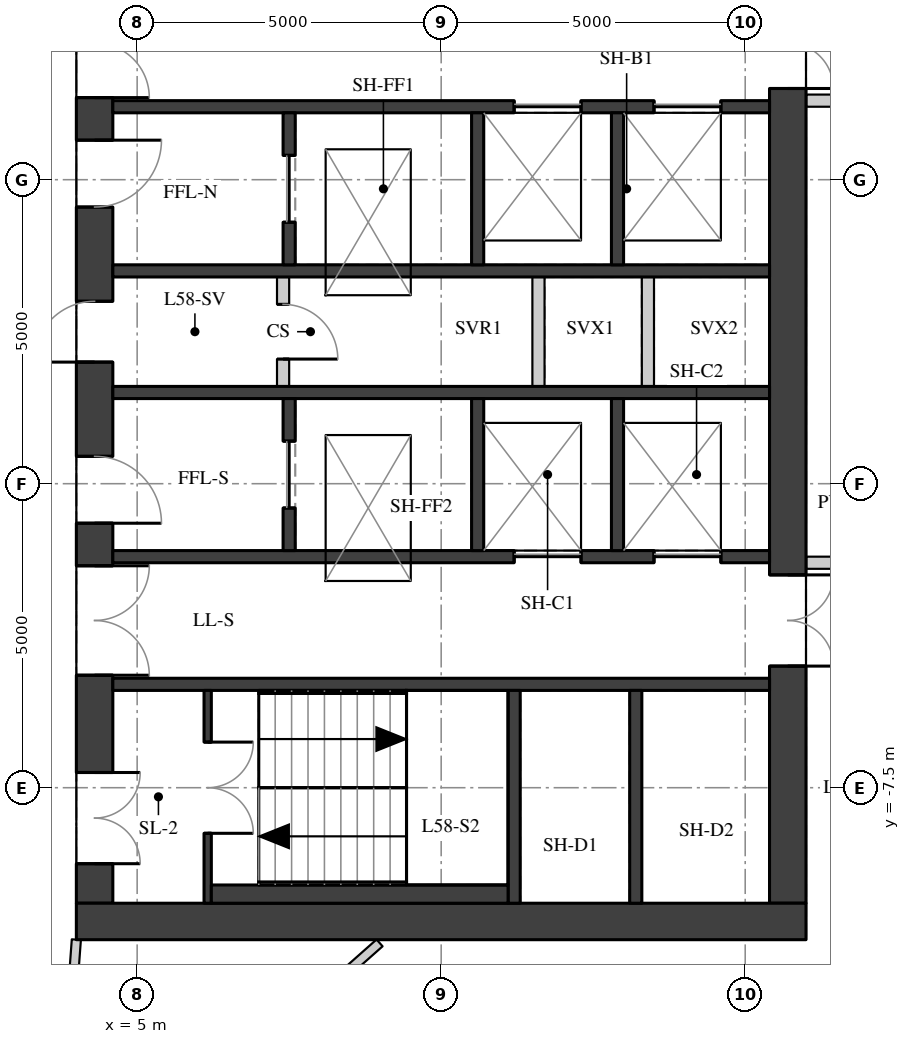
"""IFC4 building model, lengths in metres.
Left out: names, types, materials, properties, quantities, classifications, styles, units other than length and angle.
Written with IfcOpenShell. Run it as: python <this file> out.ifc"""

import sys

from ifc_helpers import new_model, si_unit, direction, frame, frame_2d, origin, place, context, subcontext, project, spatial, rectangle, extrude, element, fill, save


model = new_model("IFC4")
c1 = context("Model", 3, precision=1e-05, world=origin(), true_north=direction((0.0, 1.0)))
c2 = subcontext(c1, "Body", "Model", "MODEL_VIEW")
j1 = project(units=[si_unit("LENGTHUNIT", "METRE"), si_unit("PLANEANGLEUNIT", "RADIAN")], contexts=[c1])
p1 = place(None, origin())
s1 = spatial("IfcSite", under=j1, at=p1, CompositionType="ELEMENT")
p2 = place(p1, origin())
s2 = spatial("IfcBuilding", under=s1, at=p2, CompositionType="ELEMENT")
p3 = place(p2, frame((0.0, 0.0, 205.7)))
s3 = spatial("IfcBuildingStorey", under=s2, at=p3, CompositionType="ELEMENT", Elevation=205.7)
p4 = place(p3, frame((4.3, -9.4, 0.0), z_axis=(0.0, 0.0, 1.0), x_axis=(0.0, 1.0, 0.0)))
e1 = element("IfcWall", 1, at=p4, inside=s3, PredefinedType="SHEAR", context=c2, shape_type="SweptSolid", body=[
    extrude(rectangle(XDim=18.8, YDim=0.6, at=frame_2d((9.4, 0.0))), origin(), (0.0, 0.0, 1.0), 3.02),
])
p5 = place(p4, frame((0.65, 0.0, 0.0)))
e2 = element("IfcOpeningElement", 2, at=p5, cuts=e1, PredefinedType="OPENING", context=c2, shape_type="SweptSolid", body=[
    extrude(rectangle(XDim=1.5, YDim=2.1, at=frame_2d((0.75, 1.05))), frame((0.0, 0.31, 0.0), z_axis=(0.0, -1.0, 0.0), x_axis=(1.0, 0.0, 0.0)), (0.0, 0.0, 1.0), 0.62),
])
p6 = place(p4, frame((3.75, 0.0, 0.0)))
e3 = element("IfcOpeningElement", 3, at=p6, cuts=e1, PredefinedType="OPENING", context=c2, shape_type="SweptSolid", body=[
    extrude(rectangle(XDim=1.8, YDim=2.1, at=frame_2d((0.9, 1.05))), frame((0.0, 0.31, 0.0), z_axis=(0.0, -1.0, 0.0), x_axis=(1.0, 0.0, 0.0)), (0.0, 0.0, 1.0), 0.62),
])
p7 = place(p4, frame((6.25, 0.0, 0.0)))
e4 = element("IfcOpeningElement", 4, at=p7, cuts=e1, PredefinedType="OPENING", context=c2, shape_type="SweptSolid", body=[
    extrude(rectangle(XDim=1.1, YDim=2.1, at=frame_2d((0.55, 1.05))), frame((0.0, 0.31, 0.0), z_axis=(0.0, -1.0, 0.0), x_axis=(1.0, 0.0, 0.0)), (0.0, 0.0, 1.0), 0.62),
])
p8 = place(p4, frame((8.9, 0.0, 0.0)))
e5 = element("IfcOpeningElement", 5, at=p8, cuts=e1, PredefinedType="OPENING", context=c2, shape_type="SweptSolid", body=[
    extrude(rectangle(XDim=1.0, YDim=2.1, at=frame_2d((0.5, 1.05))), frame((0.0, 0.31, 0.0), z_axis=(0.0, -1.0, 0.0), x_axis=(1.0, 0.0, 0.0)), (0.0, 0.0, 1.0), 0.62),
])
p9 = place(p4, frame((11.45, 0.0, 0.0)))
e6 = element("IfcOpeningElement", 6, at=p9, cuts=e1, PredefinedType="OPENING", context=c2, shape_type="SweptSolid", body=[
    extrude(rectangle(XDim=1.1, YDim=2.1, at=frame_2d((0.55, 1.05))), frame((0.0, 0.31, 0.0), z_axis=(0.0, -1.0, 0.0), x_axis=(1.0, 0.0, 0.0)), (0.0, 0.0, 1.0), 0.62),
])
p10 = place(p4, frame((13.25, 0.0, 0.0)))
e7 = element("IfcOpeningElement", 7, at=p10, cuts=e1, PredefinedType="OPENING", context=c2, shape_type="SweptSolid", body=[
    extrude(rectangle(XDim=1.8, YDim=2.1, at=frame_2d((0.9, 1.05))), frame((0.0, 0.31, 0.0), z_axis=(0.0, -1.0, 0.0), x_axis=(1.0, 0.0, 0.0)), (0.0, 0.0, 1.0), 0.62),
])
p11 = place(p4, frame((16.65, 0.0, 0.0)))
e8 = element("IfcOpeningElement", 8, at=p11, cuts=e1, PredefinedType="OPENING", context=c2, shape_type="SweptSolid", body=[
    extrude(rectangle(XDim=1.5, YDim=2.1, at=frame_2d((0.75, 1.05))), frame((0.0, 0.31, 0.0), z_axis=(0.0, -1.0, 0.0), x_axis=(1.0, 0.0, 0.0)), (0.0, 0.0, 1.0), 0.62),
])
p12 = place(p3, frame((15.7, -9.4, 0.0), z_axis=(0.0, 0.0, 1.0), x_axis=(0.0, 1.0, 0.0)))
e9 = element("IfcWall", 9, at=p12, inside=s3, PredefinedType="SHEAR", context=c2, shape_type="SweptSolid", body=[
    extrude(rectangle(XDim=18.8, YDim=0.6, at=frame_2d((9.4, 0.0))), origin(), (0.0, 0.0, 1.0), 3.02),
])
p13 = place(p12, frame((13.4, 0.0, 0.0)))
e10 = element("IfcOpeningElement", 10, at=p13, cuts=e9, PredefinedType="OPENING", context=c2, shape_type="SweptSolid", body=[
    extrude(rectangle(XDim=1.5, YDim=2.1, at=frame_2d((0.75, 1.05))), frame((0.0, 0.31, 0.0), z_axis=(0.0, -1.0, 0.0), x_axis=(1.0, 0.0, 0.0)), (0.0, 0.0, 1.0), 0.62),
])
p14 = place(p12, frame((3.9, 0.0, 0.0)))
e11 = element("IfcOpeningElement", 11, at=p14, cuts=e9, PredefinedType="OPENING", context=c2, shape_type="SweptSolid", body=[
    extrude(rectangle(XDim=1.5, YDim=2.1, at=frame_2d((0.75, 1.05))), frame((0.0, 0.31, 0.0), z_axis=(0.0, -1.0, 0.0), x_axis=(1.0, 0.0, 0.0)), (0.0, 0.0, 1.0), 0.62),
])
p15 = place(p3, frame((4.0, -9.7, 0.0), z_axis=(0.0, 0.0, 1.0), x_axis=(1.0, 0.0, 0.0)))
e12 = element("IfcWall", 12, at=p15, inside=s3, PredefinedType="SHEAR", context=c2, shape_type="SweptSolid", body=[
    extrude(rectangle(XDim=12.0, YDim=0.6, at=frame_2d((6.0, 0.0))), origin(), (0.0, 0.0, 1.0), 3.02),
])
p16 = place(p3, frame((4.6, 3.7, 0.0), z_axis=(0.0, 0.0, 1.0), x_axis=(1.0, 0.0, 0.0)))
e13 = element("IfcWall", 13, at=p16, inside=s3, PredefinedType="SHEAR", context=c2, shape_type="SweptSolid", body=[
    extrude(rectangle(XDim=10.8, YDim=0.2, at=frame_2d((5.4, 0.0))), origin(), (0.0, 0.0, 1.0), 3.02),
])
p17 = place(p16, frame((6.6, 0.0, 0.0)))
e14 = element("IfcOpeningElement", 14, at=p17, cuts=e13, PredefinedType="OPENING", context=c2, shape_type="SweptSolid", body=[
    extrude(rectangle(XDim=1.1, YDim=2.1, at=frame_2d((0.55, 1.05))), frame((0.0, 0.11, 0.0), z_axis=(0.0, -1.0, 0.0), x_axis=(1.0, 0.0, 0.0)), (0.0, 0.0, 1.0), 0.22),
])
p18 = place(p16, frame((8.9, 0.0, 0.0)))
e15 = element("IfcOpeningElement", 15, at=p18, cuts=e13, PredefinedType="OPENING", context=c2, shape_type="SweptSolid", body=[
    extrude(rectangle(XDim=1.1, YDim=2.1, at=frame_2d((0.55, 1.05))), frame((0.0, 0.11, 0.0), z_axis=(0.0, -1.0, 0.0), x_axis=(1.0, 0.0, 0.0)), (0.0, 0.0, 1.0), 0.22),
])
for number, where, z_axis, x_axis in (
    (16, (4.6, 1.0, 0.0), (0.0, 0.0, 1.0), (1.0, 0.0, 0.0)),
    (17, (4.6, -1.0, 0.0), (0.0, 0.0, 1.0), (1.0, 0.0, 0.0)),
):
    element("IfcWall", number, at=place(p3, frame(where, z_axis=z_axis, x_axis=x_axis)), inside=s3, PredefinedType="SHEAR", context=c2, shape_type="SweptSolid", body=[
        extrude(rectangle(XDim=10.8, YDim=0.2, at=frame_2d((5.4, 0.0))), origin(), (0.0, 0.0, 1.0), 3.02),
    ])
p19 = place(p3, frame((4.6, -3.7, 0.0), z_axis=(0.0, 0.0, 1.0), x_axis=(1.0, 0.0, 0.0)))
e18 = element("IfcWall", 18, at=p19, inside=s3, PredefinedType="SHEAR", context=c2, shape_type="SweptSolid", body=[
    extrude(rectangle(XDim=10.8, YDim=0.2, at=frame_2d((5.4, 0.0))), origin(), (0.0, 0.0, 1.0), 3.02),
])
p20 = place(p19, frame((6.6, 0.0, 0.0)))
e19 = element("IfcOpeningElement", 19, at=p20, cuts=e18, PredefinedType="OPENING", context=c2, shape_type="SweptSolid", body=[
    extrude(rectangle(XDim=1.1, YDim=2.1, at=frame_2d((0.55, 1.05))), frame((0.0, 0.11, 0.0), z_axis=(0.0, -1.0, 0.0), x_axis=(1.0, 0.0, 0.0)), (0.0, 0.0, 1.0), 0.22),
])
p21 = place(p19, frame((8.9, 0.0, 0.0)))
e20 = element("IfcOpeningElement", 20, at=p21, cuts=e18, PredefinedType="OPENING", context=c2, shape_type="SweptSolid", body=[
    extrude(rectangle(XDim=1.1, YDim=2.1, at=frame_2d((0.55, 1.05))), frame((0.0, 0.11, 0.0), z_axis=(0.0, -1.0, 0.0), x_axis=(1.0, 0.0, 0.0)), (0.0, 0.0, 1.0), 0.22),
])
p22 = place(p3, frame((4.6, -5.8, 0.0), z_axis=(0.0, 0.0, 1.0), x_axis=(1.0, 0.0, 0.0)))
e21 = element("IfcWall", 21, at=p22, inside=s3, PredefinedType="SHEAR", context=c2, shape_type="SweptSolid", body=[
    extrude(rectangle(XDim=10.8, YDim=0.2, at=frame_2d((5.4, 0.0))), origin(), (0.0, 0.0, 1.0), 3.02),
])
for number, where, z_axis, x_axis in (
    (22, (11.2, -9.4, 0.0), (0.0, 0.0, 1.0), (0.0, 1.0, 0.0)),
    (23, (13.2, -9.4, 0.0), (0.0, 0.0, 1.0), (0.0, 1.0, 0.0)),
):
    element("IfcWall", number, at=place(p3, frame(where, z_axis=z_axis, x_axis=x_axis)), inside=s3, PredefinedType="SHEAR", context=c2, shape_type="SweptSolid", body=[
        extrude(rectangle(XDim=3.5, YDim=0.2, at=frame_2d((1.75, 0.0))), origin(), (0.0, 0.0, 1.0), 3.02),
    ])
p23 = place(p3, frame((7.5, 1.1, 0.0), z_axis=(0.0, 0.0, 1.0), x_axis=(0.0, 1.0, 0.0)))
e24 = element("IfcWall", 24, at=p23, inside=s3, PredefinedType="SHEAR", context=c2, shape_type="SweptSolid", body=[
    extrude(rectangle(XDim=2.5, YDim=0.2, at=frame_2d((1.25, 0.0))), origin(), (0.0, 0.0, 1.0), 3.02),
])
p24 = place(p23, frame((0.7, 0.0, 0.0)))
e25 = element("IfcOpeningElement", 25, at=p24, cuts=e24, PredefinedType="OPENING", context=c2, shape_type="SweptSolid", body=[
    extrude(rectangle(XDim=1.1, YDim=2.1, at=frame_2d((0.55, 1.05))), frame((0.0, 0.11, 0.0), z_axis=(0.0, -1.0, 0.0), x_axis=(1.0, 0.0, 0.0)), (0.0, 0.0, 1.0), 0.22),
])
p25 = place(p3, frame((7.5, -3.6, 0.0), z_axis=(0.0, 0.0, 1.0), x_axis=(0.0, 1.0, 0.0)))
e26 = element("IfcWall", 26, at=p25, inside=s3, PredefinedType="SHEAR", context=c2, shape_type="SweptSolid", body=[
    extrude(rectangle(XDim=2.5, YDim=0.2, at=frame_2d((1.25, 0.0))), origin(), (0.0, 0.0, 1.0), 3.02),
])
p26 = place(p25, frame((0.7, 0.0, 0.0)))
e27 = element("IfcOpeningElement", 27, at=p26, cuts=e26, PredefinedType="OPENING", context=c2, shape_type="SweptSolid", body=[
    extrude(rectangle(XDim=1.1, YDim=2.1, at=frame_2d((0.55, 1.05))), frame((0.0, 0.11, 0.0), z_axis=(0.0, -1.0, 0.0), x_axis=(1.0, 0.0, 0.0)), (0.0, 0.0, 1.0), 0.22),
])
for number, where, z_axis, x_axis in (
    (28, (10.6, 1.1, 0.0), (0.0, 0.0, 1.0), (0.0, 1.0, 0.0)),
    (29, (10.6, -3.6, 0.0), (0.0, 0.0, 1.0), (0.0, 1.0, 0.0)),
    (30, (12.9, 1.1, 0.0), (0.0, 0.0, 1.0), (0.0, 1.0, 0.0)),
    (31, (12.9, -3.6, 0.0), (0.0, 0.0, 1.0), (0.0, 1.0, 0.0)),
):
    element("IfcWall", number, at=place(p3, frame(where, z_axis=z_axis, x_axis=x_axis)), inside=s3, PredefinedType="SHEAR", context=c2, shape_type="SweptSolid", body=[
        extrude(rectangle(XDim=2.5, YDim=0.2, at=frame_2d((1.25, 0.0))), origin(), (0.0, 0.0, 1.0), 3.02),
    ])
p27 = place(p3, frame((6.16, -9.4, 0.0), z_axis=(0.0, 0.0, 1.0), x_axis=(0.0, 1.0, 0.0)))
e32 = element("IfcWall", 32, at=p27, inside=s3, PredefinedType="SHEAR", context=c2, shape_type="SweptSolid", body=[
    extrude(rectangle(XDim=3.5, YDim=0.12, at=frame_2d((1.75, 0.0))), origin(), (0.0, 0.0, 1.0), 3.02),
])
p28 = place(p27, frame((1.15, 0.0, 0.0)))
e33 = element("IfcOpeningElement", 33, at=p28, cuts=e32, PredefinedType="OPENING", context=c2, shape_type="SweptSolid", body=[
    extrude(rectangle(XDim=1.5, YDim=2.1, at=frame_2d((0.75, 1.05))), frame((0.0, 0.07, 0.0), z_axis=(0.0, -1.0, 0.0), x_axis=(1.0, 0.0, 0.0)), (0.0, 0.0, 1.0), 0.14),
])
p29 = place(p3, frame((7.4, -0.9, 0.0), z_axis=(0.0, 0.0, 1.0), x_axis=(0.0, 1.0, 0.0)))
e34 = element("IfcWall", 34, at=p29, inside=s3, PredefinedType="PARTITIONING", context=c2, shape_type="SweptSolid", body=[
    extrude(rectangle(XDim=1.8, YDim=0.2, at=frame_2d((0.9, 0.0))), origin(), (0.0, 0.0, 1.0), 3.02),
])
p30 = place(p29, frame((0.45, 0.0, 0.0)))
e35 = element("IfcOpeningElement", 35, at=p30, cuts=e34, PredefinedType="OPENING", context=c2, shape_type="SweptSolid", body=[
    extrude(rectangle(XDim=0.9, YDim=2.1, at=frame_2d((0.45, 1.05))), frame((0.0, 0.11, 0.0), z_axis=(0.0, -1.0, 0.0), x_axis=(1.0, 0.0, 0.0)), (0.0, 0.0, 1.0), 0.22),
])
for number, where, z_axis, x_axis in (
    (36, (11.6, -0.9, 0.0), (0.0, 0.0, 1.0), (0.0, 1.0, 0.0)),
    (37, (13.4, -0.9, 0.0), (0.0, 0.0, 1.0), (0.0, 1.0, 0.0)),
):
    element("IfcWall", number, at=place(p3, frame(where, z_axis=z_axis, x_axis=x_axis)), inside=s3, PredefinedType="PARTITIONING", context=c2, shape_type="SweptSolid", body=[
        extrude(rectangle(XDim=1.8, YDim=0.2, at=frame_2d((0.9, 0.0))), origin(), (0.0, 0.0, 1.0), 3.02),
    ])
p31 = place(p3, frame((6.22, -9.25, 0.0), z_axis=(0.0, 0.0, 1.0), x_axis=(1.0, 0.0, 0.0)))
e38 = element("IfcWall", 38, at=p31, inside=s3, PredefinedType="PARTITIONING", context=c2, shape_type="SweptSolid", body=[
    extrude(rectangle(XDim=4.88, YDim=0.3, at=frame_2d((2.44, 0.0))), origin(), (0.0, 0.0, 1.0), 3.02),
])
p32 = place(p3, frame((17.6, 3.8, 0.0), z_axis=(0.0, 0.0, 1.0), x_axis=(-1.0, 0.0, 0.0)))
e39 = element("IfcWall", 39, at=p32, inside=s3, PredefinedType="PARTITIONING", context=c2, shape_type="SweptSolid", body=[
    extrude(rectangle(XDim=1.596, YDim=0.2, at=frame_2d((0.798, 0.0))), origin(), (0.0, 0.0, 1.0), 3.02),
])
p33 = place(p3, frame((16.004, -3.8, 0.0), z_axis=(0.0, 0.0, 1.0), x_axis=(1.0, 0.0, 0.0)))
e40 = element("IfcWall", 40, at=p33, inside=s3, PredefinedType="PARTITIONING", context=c2, shape_type="SweptSolid", body=[
    extrude(rectangle(XDim=1.596, YDim=0.2, at=frame_2d((0.798, 0.0))), origin(), (0.0, 0.0, 1.0), 2.47),
])
p34 = place(p3, frame((8.987, -10.052, 0.0), z_axis=(0.0, 0.0, 1.0), x_axis=(-0.74833949077, -0.66331591761, 0.0)))
e41 = element("IfcWall", 41, at=p34, inside=s3, PredefinedType="PARTITIONING", context=c2, shape_type="SweptSolid", body=[
    extrude(rectangle(XDim=3.328, YDim=0.15, at=frame_2d((1.664, 0.0))), origin(), (0.0, 0.0, 1.0), 3.02),
])
p35 = place(p34, frame((1.214, 0.0, 0.0)))
e42 = element("IfcOpeningElement", 42, at=p35, cuts=e41, PredefinedType="OPENING", context=c2, shape_type="SweptSolid", body=[
    extrude(rectangle(XDim=0.9, YDim=2.1, at=frame_2d((0.45, 1.05))), frame((0.0, 0.085, 0.0), z_axis=(0.0, -1.0, 0.0), x_axis=(1.0, 0.0, 0.0)), (0.0, 0.0, 1.0), 0.17),
])
p36 = place(p3, frame((3.807, -12.588, 0.0), z_axis=(0.0, 0.0, 1.0), x_axis=(0.07420077159, 0.997243323114, 0.0)))
e43 = element("IfcWall", 43, at=p36, inside=s3, PredefinedType="PARTITIONING", context=c2, shape_type="SweptSolid", body=[
    extrude(rectangle(XDim=2.596, YDim=0.15, at=frame_2d((1.298, 0.0))), origin(), (0.0, 0.0, 1.0), 3.02),
])
p37 = place(p5, origin())
e44 = element("IfcDoor", 44, at=p37, inside=s3, OperationType="DOUBLE_DOOR_SINGLE_SWING", PredefinedType="DOOR", context=c2, shape_type="SweptSolid", body=[
    extrude(rectangle(XDim=1.5, YDim=2.1, at=frame_2d((0.75, 1.05))), frame((0.0, 0.025, 0.0), z_axis=(0.0, -1.0, 0.0), x_axis=(1.0, 0.0, 0.0)), (0.0, 0.0, 1.0), 0.05),
])
fill(e2, e44)
p38 = place(p6, origin())
e45 = element("IfcDoor", 45, at=p38, inside=s3, OperationType="DOUBLE_DOOR_SINGLE_SWING", PredefinedType="DOOR", context=c2, shape_type="SweptSolid", body=[
    extrude(rectangle(XDim=1.8, YDim=2.1, at=frame_2d((0.9, 1.05))), frame((0.0, 0.025, 0.0), z_axis=(0.0, -1.0, 0.0), x_axis=(1.0, 0.0, 0.0)), (0.0, 0.0, 1.0), 0.05),
])
fill(e3, e45)
p39 = place(p7, origin())
e46 = element("IfcDoor", 46, at=p39, inside=s3, OperationType="SINGLE_SWING_RIGHT", PredefinedType="DOOR", context=c2, shape_type="SweptSolid", body=[
    extrude(rectangle(XDim=1.1, YDim=2.1, at=frame_2d((0.55, 1.05))), frame((0.0, 0.025, 0.0), z_axis=(0.0, -1.0, 0.0), x_axis=(1.0, 0.0, 0.0)), (0.0, 0.0, 1.0), 0.05),
])
fill(e4, e46)
p40 = place(p8, origin())
e47 = element("IfcDoor", 47, at=p40, inside=s3, OperationType="SINGLE_SWING_LEFT", PredefinedType="DOOR", context=c2, shape_type="SweptSolid", body=[
    extrude(rectangle(XDim=1.0, YDim=2.1, at=frame_2d((0.5, 1.05))), frame((0.0, 0.025, 0.0), z_axis=(0.0, -1.0, 0.0), x_axis=(1.0, 0.0, 0.0)), (0.0, 0.0, 1.0), 0.05),
])
fill(e5, e47)
p41 = place(p9, origin())
e48 = element("IfcDoor", 48, at=p41, inside=s3, OperationType="SINGLE_SWING_LEFT", PredefinedType="DOOR", context=c2, shape_type="SweptSolid", body=[
    extrude(rectangle(XDim=1.1, YDim=2.1, at=frame_2d((0.55, 1.05))), frame((0.0, 0.025, 0.0), z_axis=(0.0, -1.0, 0.0), x_axis=(1.0, 0.0, 0.0)), (0.0, 0.0, 1.0), 0.05),
])
fill(e6, e48)
p42 = place(p10, origin())
e49 = element("IfcDoor", 49, at=p42, inside=s3, OperationType="DOUBLE_DOOR_SINGLE_SWING", PredefinedType="DOOR", context=c2, shape_type="SweptSolid", body=[
    extrude(rectangle(XDim=1.8, YDim=2.1, at=frame_2d((0.9, 1.05))), frame((0.0, 0.025, 0.0), z_axis=(0.0, -1.0, 0.0), x_axis=(1.0, 0.0, 0.0)), (0.0, 0.0, 1.0), 0.05),
])
fill(e7, e49)
p43 = place(p13, origin())
e50 = element("IfcDoor", 50, at=p43, inside=s3, OperationType="DOUBLE_DOOR_SINGLE_SWING", PredefinedType="DOOR", context=c2, shape_type="SweptSolid", body=[
    extrude(rectangle(XDim=1.5, YDim=2.1, at=frame_2d((0.75, 1.05))), frame((0.0, 0.025, 0.0), z_axis=(0.0, -1.0, 0.0), x_axis=(1.0, 0.0, 0.0)), (0.0, 0.0, 1.0), 0.05),
])
fill(e10, e50)
p44 = place(p14, origin())
e51 = element("IfcDoor", 51, at=p44, inside=s3, OperationType="DOUBLE_DOOR_SINGLE_SWING", PredefinedType="DOOR", context=c2, shape_type="SweptSolid", body=[
    extrude(rectangle(XDim=1.5, YDim=2.1, at=frame_2d((0.75, 1.05))), frame((0.0, 0.025, 0.0), z_axis=(0.0, -1.0, 0.0), x_axis=(1.0, 0.0, 0.0)), (0.0, 0.0, 1.0), 0.05),
])
fill(e11, e51)
p45 = place(p28, origin())
e52 = element("IfcDoor", 52, at=p45, inside=s3, OperationType="DOUBLE_DOOR_SINGLE_SWING", PredefinedType="DOOR", context=c2, shape_type="SweptSolid", body=[
    extrude(rectangle(XDim=1.5, YDim=2.1, at=frame_2d((0.75, 1.05))), frame((0.0, 0.025, 0.0), z_axis=(0.0, -1.0, 0.0), x_axis=(1.0, 0.0, 0.0)), (0.0, 0.0, 1.0), 0.05),
])
fill(e33, e52)
p46 = place(p17, origin())
e53 = element("IfcDoor", 53, at=p46, inside=s3, OperationType="DOUBLE_DOOR_SLIDING", PredefinedType="DOOR", context=c2, shape_type="SweptSolid", body=[
    extrude(rectangle(XDim=1.1, YDim=2.1, at=frame_2d((0.55, 1.05))), frame((0.0, 0.025, 0.0), z_axis=(0.0, -1.0, 0.0), x_axis=(1.0, 0.0, 0.0)), (0.0, 0.0, 1.0), 0.05),
])
fill(e14, e53)
p47 = place(p18, origin())
e54 = element("IfcDoor", 54, at=p47, inside=s3, OperationType="DOUBLE_DOOR_SLIDING", PredefinedType="DOOR", context=c2, shape_type="SweptSolid", body=[
    extrude(rectangle(XDim=1.1, YDim=2.1, at=frame_2d((0.55, 1.05))), frame((0.0, 0.025, 0.0), z_axis=(0.0, -1.0, 0.0), x_axis=(1.0, 0.0, 0.0)), (0.0, 0.0, 1.0), 0.05),
])
fill(e15, e54)
p48 = place(p20, origin())
e55 = element("IfcDoor", 55, at=p48, inside=s3, OperationType="DOUBLE_DOOR_SLIDING", PredefinedType="DOOR", context=c2, shape_type="SweptSolid", body=[
    extrude(rectangle(XDim=1.1, YDim=2.1, at=frame_2d((0.55, 1.05))), frame((0.0, 0.025, 0.0), z_axis=(0.0, -1.0, 0.0), x_axis=(1.0, 0.0, 0.0)), (0.0, 0.0, 1.0), 0.05),
])
fill(e19, e55)
p49 = place(p21, origin())
e56 = element("IfcDoor", 56, at=p49, inside=s3, OperationType="DOUBLE_DOOR_SLIDING", PredefinedType="DOOR", context=c2, shape_type="SweptSolid", body=[
    extrude(rectangle(XDim=1.1, YDim=2.1, at=frame_2d((0.55, 1.05))), frame((0.0, 0.025, 0.0), z_axis=(0.0, -1.0, 0.0), x_axis=(1.0, 0.0, 0.0)), (0.0, 0.0, 1.0), 0.05),
])
fill(e20, e56)
p50 = place(p24, origin())
e57 = element("IfcDoor", 57, at=p50, inside=s3, OperationType="DOUBLE_DOOR_SLIDING", PredefinedType="DOOR", context=c2, shape_type="SweptSolid", body=[
    extrude(rectangle(XDim=1.1, YDim=2.1, at=frame_2d((0.55, 1.05))), frame((0.0, 0.025, 0.0), z_axis=(0.0, -1.0, 0.0), x_axis=(1.0, 0.0, 0.0)), (0.0, 0.0, 1.0), 0.05),
])
fill(e25, e57)
p51 = place(p26, origin())
e58 = element("IfcDoor", 58, at=p51, inside=s3, OperationType="DOUBLE_DOOR_SLIDING", PredefinedType="DOOR", context=c2, shape_type="SweptSolid", body=[
    extrude(rectangle(XDim=1.1, YDim=2.1, at=frame_2d((0.55, 1.05))), frame((0.0, 0.025, 0.0), z_axis=(0.0, -1.0, 0.0), x_axis=(1.0, 0.0, 0.0)), (0.0, 0.0, 1.0), 0.05),
])
fill(e27, e58)
p52 = place(p30, origin())
e59 = element("IfcDoor", 59, at=p52, inside=s3, OperationType="SINGLE_SWING_RIGHT", PredefinedType="DOOR", context=c2, shape_type="SweptSolid", body=[
    extrude(rectangle(XDim=0.9, YDim=2.1, at=frame_2d((0.45, 1.05))), frame((0.0, 0.025, 0.0), z_axis=(0.0, -1.0, 0.0), x_axis=(1.0, 0.0, 0.0)), (0.0, 0.0, 1.0), 0.05),
])
fill(e35, e59)
save(model, sys.argv[1])
